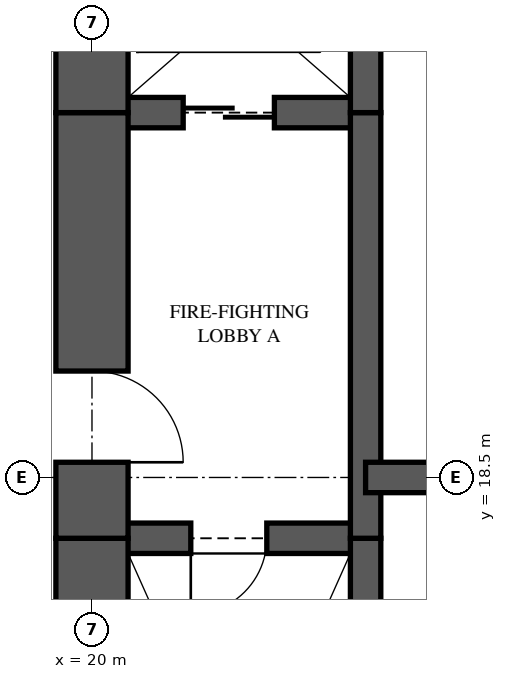
"""IFC4 building model, lengths in metres.
Left out: names, types, materials, properties, quantities, classifications, styles, units other than length and angle.
Written with IfcOpenShell. Run it as: python <this file> out.ifc"""

import sys

from ifc_helpers import new_model, si_unit, direction, frame, frame_2d, origin, place, context, subcontext, project, spatial, rectangle, extrude, element, fill, save


model = new_model("IFC4")
c1 = context("Model", 3, precision=1e-05, world=origin(), true_north=direction((0.0, 1.0)))
c2 = subcontext(c1, "Body", "Model", "MODEL_VIEW")
j1 = project(units=[si_unit("LENGTHUNIT", "METRE"), si_unit("PLANEANGLEUNIT", "RADIAN")], contexts=[c1])
p1 = place(None, origin())
s1 = spatial("IfcSite", under=j1, at=p1, CompositionType="ELEMENT")
p2 = place(p1, origin())
s2 = spatial("IfcBuilding", under=s1, at=p2, CompositionType="ELEMENT")
p3 = place(p2, frame((0.0, 0.0, 31.05)))
s3 = spatial("IfcBuildingStorey", under=s2, at=p3, CompositionType="ELEMENT", Elevation=31.05)
p4 = place(p3, frame((20.0, 26.05, 0.0), z_axis=(0.0, 0.0, 1.0), x_axis=(0.0, -1.0, 0.0)))
e1 = element("IfcWall", 1, at=p4, inside=s3, PredefinedType="SHEAR", context=c2, shape_type="SweptSolid", body=[
    extrude(rectangle(XDim=2.75, YDim=0.95, at=frame_2d((1.375, 0.0))), origin(), (0.0, 0.0, 1.0), 3.35),
])
p5 = place(p3, frame((20.0, 23.3, 0.0), z_axis=(0.0, 0.0, 1.0), x_axis=(0.0, -1.0, 0.0)))
e2 = element("IfcWall", 2, at=p5, inside=s3, PredefinedType="SHEAR", context=c2, shape_type="SweptSolid", body=[
    extrude(rectangle(XDim=5.6, YDim=0.95, at=frame_2d((2.8, 0.0))), origin(), (0.0, 0.0, 1.0), 3.35),
])
p6 = place(p5, frame((3.4, 0.0, 0.0)))
e3 = element("IfcOpeningElement", 3, at=p6, cuts=e2, PredefinedType="OPENING", context=c2, shape_type="SweptSolid", body=[
    extrude(rectangle(XDim=1.2, YDim=2.2, at=frame_2d((0.6, 1.1))), frame((0.0, 0.485, 0.0), z_axis=(0.0, -1.0, 0.0), x_axis=(1.0, 0.0, 0.0)), (0.0, 0.0, 1.0), 0.97),
])
p7 = place(p3, frame((20.0, 17.7, 0.0), z_axis=(0.0, 0.0, 1.0), x_axis=(0.0, -1.0, 0.0)))
e4 = element("IfcWall", 4, at=p7, inside=s3, PredefinedType="SHEAR", context=c2, shape_type="SweptSolid", body=[
    extrude(rectangle(XDim=4.7, YDim=0.95, at=frame_2d((2.35, 0.0))), origin(), (0.0, 0.0, 1.0), 3.35),
])
p8 = place(p3, frame((23.6, 10.95, 0.0), z_axis=(0.0, 0.0, 1.0), x_axis=(0.0, 1.0, 0.0)))
e5 = element("IfcWall", 5, at=p8, inside=s3, PredefinedType="SHEAR", context=c2, shape_type="SweptSolid", body=[
    extrude(rectangle(XDim=6.75, YDim=0.4, at=frame_2d((3.375, 0.0))), origin(), (0.0, 0.0, 1.0), 3.35),
])
p9 = place(p3, frame((23.6, 17.7, 0.0), z_axis=(0.0, 0.0, 1.0), x_axis=(0.0, 1.0, 0.0)))
e6 = element("IfcWall", 6, at=p9, inside=s3, PredefinedType="SHEAR", context=c2, shape_type="SweptSolid", body=[
    extrude(rectangle(XDim=5.6, YDim=0.4, at=frame_2d((2.8, 0.0))), origin(), (0.0, 0.0, 1.0), 3.35),
])
p10 = place(p3, frame((23.6, 23.3, 0.0), z_axis=(0.0, 0.0, 1.0), x_axis=(0.0, 1.0, 0.0)))
e7 = element("IfcWall", 7, at=p10, inside=s3, PredefinedType="SHEAR", context=c2, shape_type="SweptSolid", body=[
    extrude(rectangle(XDim=2.75, YDim=0.4, at=frame_2d((1.375, 0.0))), origin(), (0.0, 0.0, 1.0), 3.35),
])
p11 = place(p3, frame((20.0, 17.7, 0.0), z_axis=(0.0, 0.0, 1.0), x_axis=(1.0, 0.0, 0.0)))
e8 = element("IfcWall", 8, at=p11, inside=s3, PredefinedType="SHEAR", context=c2, shape_type="SweptSolid", body=[
    extrude(rectangle(XDim=3.6, YDim=0.4, at=frame_2d((1.8, 0.0))), origin(), (0.0, 0.0, 1.0), 3.35),
])
p12 = place(p11, frame((1.3, 0.0, 0.0)))
e9 = element("IfcOpeningElement", 9, at=p12, cuts=e8, PredefinedType="OPENING", context=c2, shape_type="SweptSolid", body=[
    extrude(rectangle(XDim=1.0, YDim=2.1, at=frame_2d((0.5, 1.05))), frame((0.0, 0.21, 0.0), z_axis=(0.0, -1.0, 0.0), x_axis=(1.0, 0.0, 0.0)), (0.0, 0.0, 1.0), 0.42),
])
p13 = place(p3, frame((20.0, 23.3, 0.0), z_axis=(0.0, 0.0, 1.0), x_axis=(1.0, 0.0, 0.0)))
e10 = element("IfcWall", 10, at=p13, inside=s3, PredefinedType="SHEAR", context=c2, shape_type="SweptSolid", body=[
    extrude(rectangle(XDim=3.6, YDim=0.4, at=frame_2d((1.8, 0.0))), origin(), (0.0, 0.0, 1.0), 3.35),
])
p14 = place(p13, frame((1.2, 0.0, 0.0)))
e11 = element("IfcOpeningElement", 11, at=p14, cuts=e10, PredefinedType="OPENING", context=c2, shape_type="SweptSolid", body=[
    extrude(rectangle(XDim=1.2, YDim=2.1, at=frame_2d((0.6, 1.05))), frame((0.0, 0.21, 0.0), z_axis=(0.0, -1.0, 0.0), x_axis=(1.0, 0.0, 0.0)), (0.0, 0.0, 1.0), 0.42),
])
p15 = place(p3, frame((23.6, 18.5, 0.0), z_axis=(0.0, 0.0, 1.0), x_axis=(1.0, 0.0, 0.0)))
e12 = element("IfcWall", 12, at=p15, inside=s3, PredefinedType="SHEAR", context=c2, shape_type="SweptSolid", body=[
    extrude(rectangle(XDim=2.4, YDim=0.4, at=frame_2d((1.2, 0.0))), origin(), (0.0, 0.0, 1.0), 3.35),
])
p16 = place(p12, frame((1.0, 0.0, 0.0), z_axis=(0.0, 0.0, 1.0), x_axis=(-1.0, 0.0, 0.0)))
e13 = element("IfcDoor", 13, at=p16, inside=s3, OperationType="SINGLE_SWING_RIGHT", PredefinedType="DOOR", context=c2, shape_type="SweptSolid", body=[
    extrude(rectangle(XDim=1.0, YDim=2.1, at=frame_2d((0.5, 1.05))), frame((0.0, 0.025, 0.0), z_axis=(0.0, -1.0, 0.0), x_axis=(1.0, 0.0, 0.0)), (0.0, 0.0, 1.0), 0.05),
])
fill(e9, e13)
p17 = place(p6, origin())
e14 = element("IfcDoor", 14, at=p17, inside=s3, OperationType="SINGLE_SWING_RIGHT", PredefinedType="DOOR", context=c2, shape_type="SweptSolid", body=[
    extrude(rectangle(XDim=1.2, YDim=2.2, at=frame_2d((0.6, 1.1))), frame((0.0, 0.025, 0.0), z_axis=(0.0, -1.0, 0.0), x_axis=(1.0, 0.0, 0.0)), (0.0, 0.0, 1.0), 0.05),
])
fill(e3, e14)
p18 = place(p14, origin())
e15 = element("IfcDoor", 15, at=p18, inside=s3, OperationType="SLIDING_TO_LEFT", PredefinedType="DOOR", context=c2, shape_type="SweptSolid", body=[
    extrude(rectangle(XDim=1.2, YDim=2.1, at=frame_2d((0.6, 1.05))), frame((0.0, 0.025, 0.0), z_axis=(0.0, -1.0, 0.0), x_axis=(1.0, 0.0, 0.0)), (0.0, 0.0, 1.0), 0.05),
])
fill(e11, e15)
save(model, sys.argv[1])
